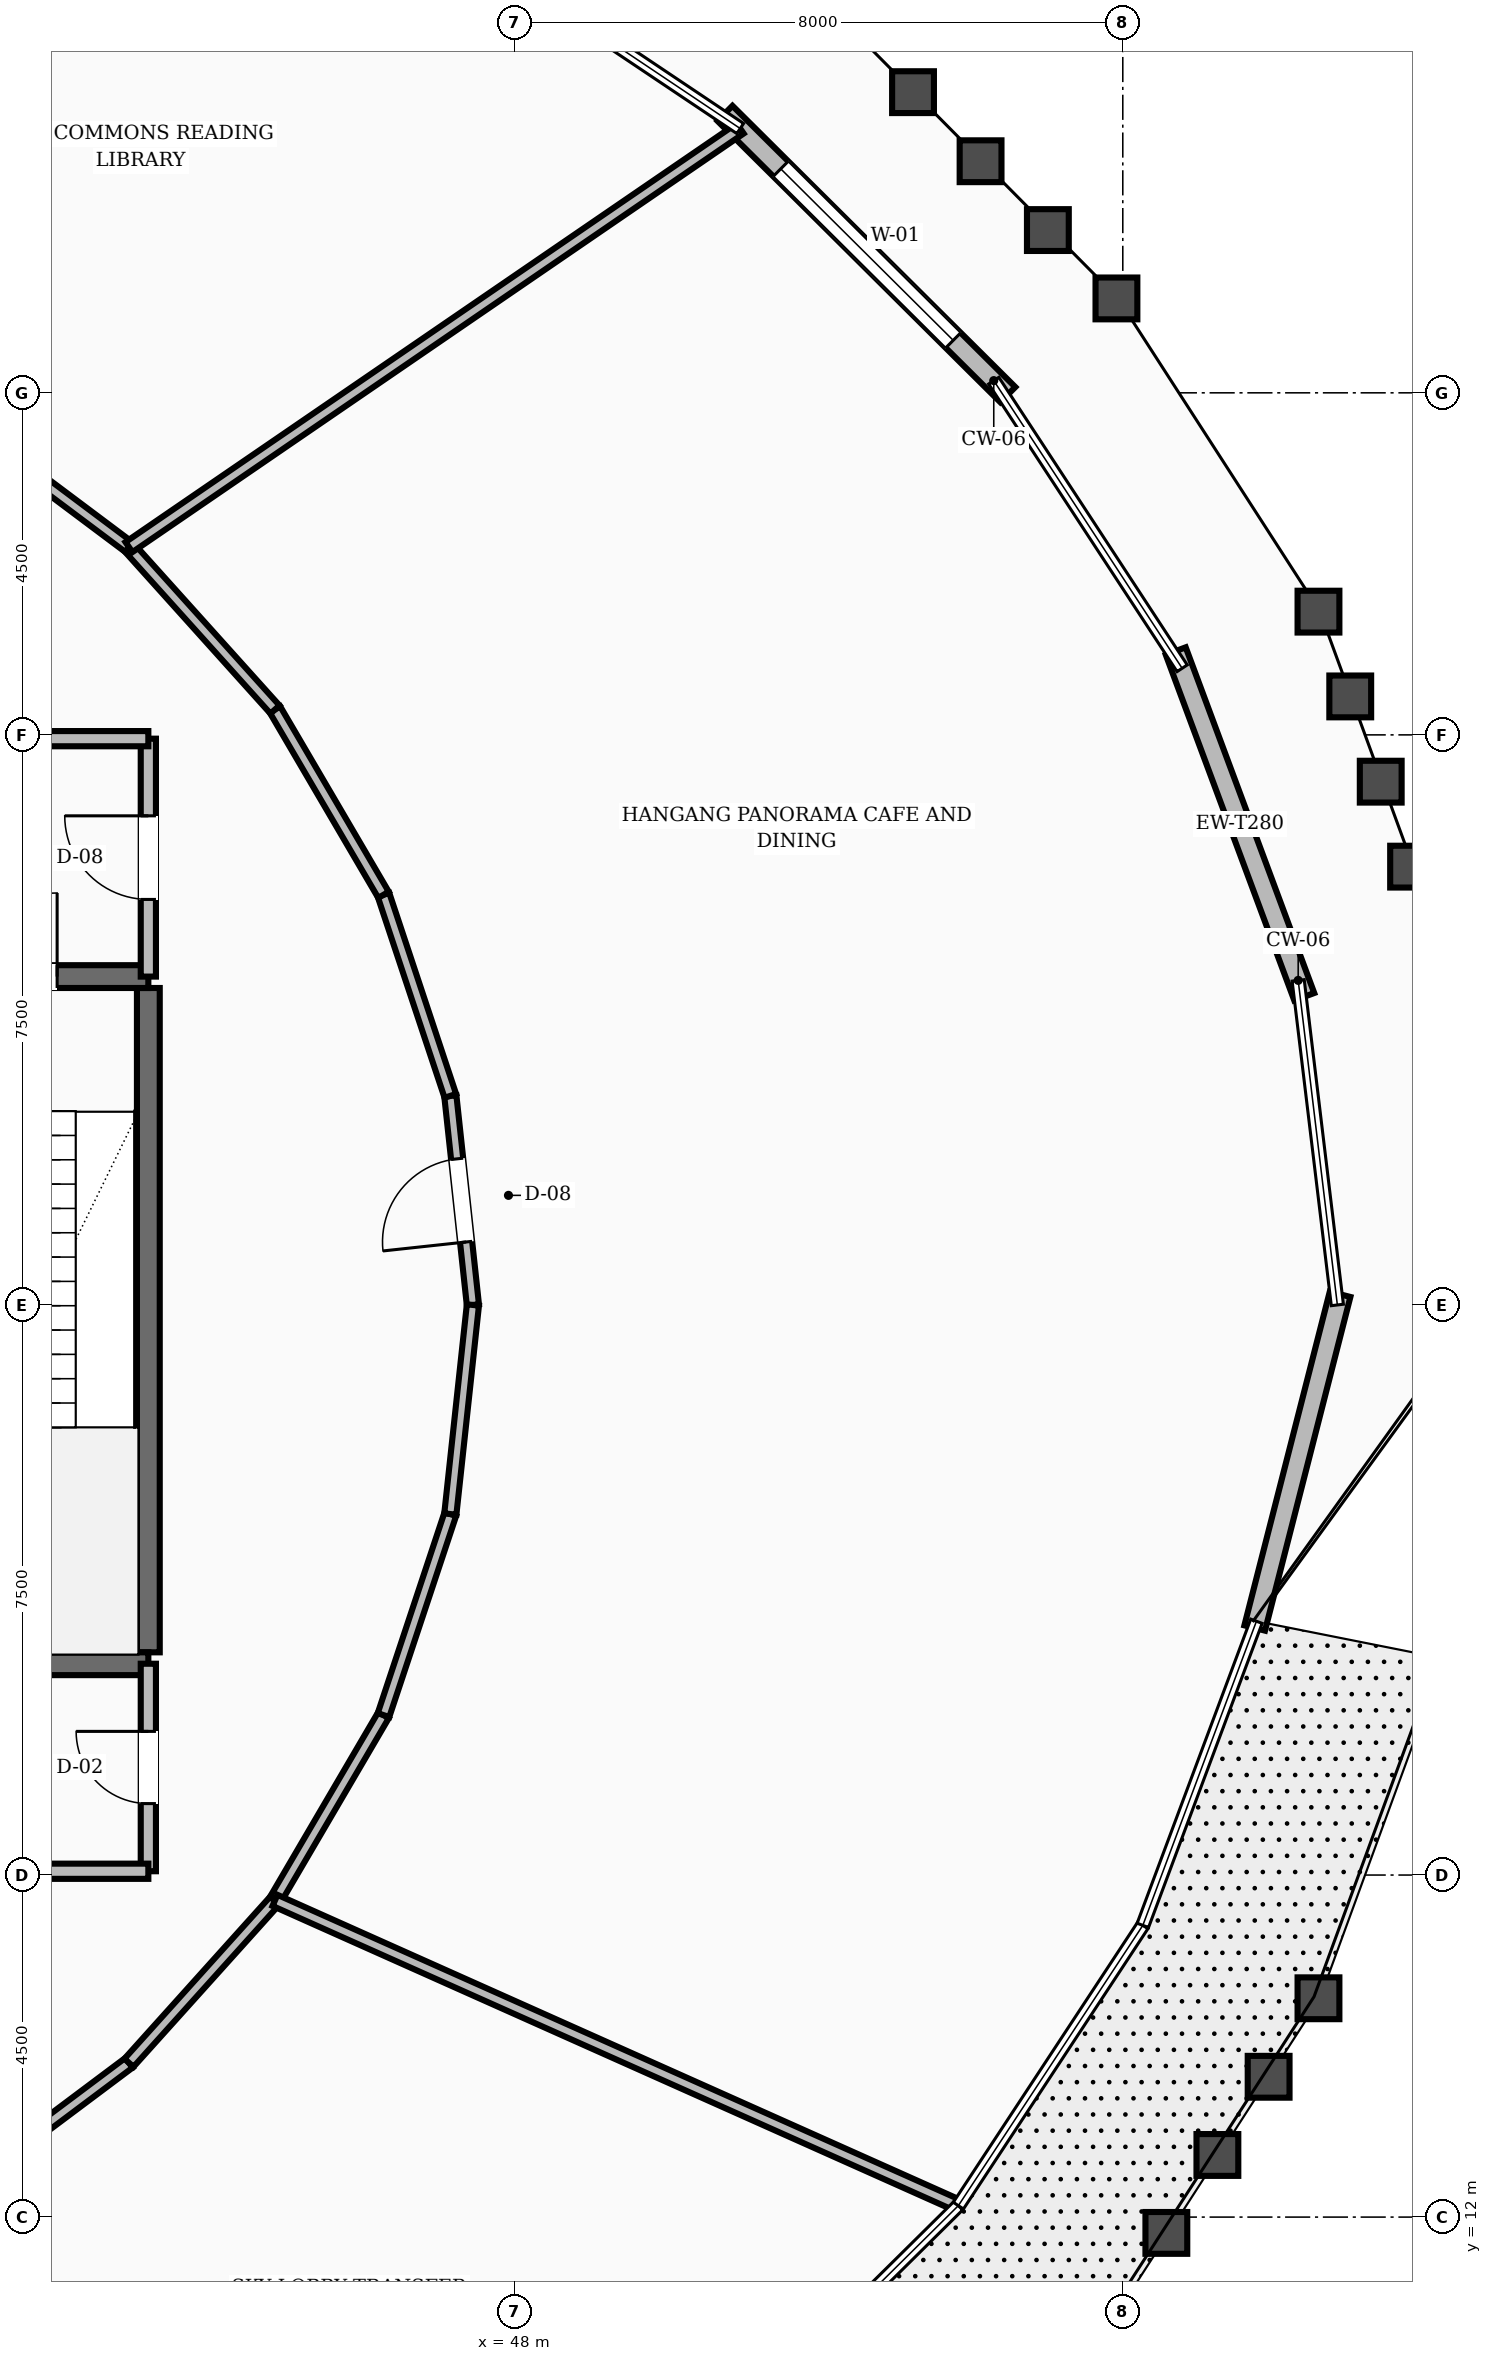
"""IFC4 building model, lengths in metres.
Left out: names, types, materials, properties, quantities, classifications, styles, units other than length and angle.
Written with IfcOpenShell. Run it as: python <this file> out.ifc"""

import sys

from ifc_helpers import new_model, si_unit, direction, frame, frame_2d, origin, place, context, subcontext, project, spatial, rectangle, extrude, element, fill, save


model = new_model("IFC4")
c1 = context("Model", 3, precision=1e-05, world=origin(), true_north=direction((0.0, 1.0)))
c2 = subcontext(c1, "Body", "Model", "MODEL_VIEW")
j1 = project(units=[si_unit("LENGTHUNIT", "METRE"), si_unit("PLANEANGLEUNIT", "RADIAN")], contexts=[c1])
p1 = place(None, origin())
s1 = spatial("IfcSite", under=j1, at=p1, CompositionType="ELEMENT")
p2 = place(p1, origin())
s2 = spatial("IfcBuilding", under=s1, at=p2, CompositionType="ELEMENT")
p3 = place(p2, frame((0.0, 0.0, 106.0)))
s3 = spatial("IfcBuildingStorey", under=s2, at=p3, CompositionType="ELEMENT", Elevation=106.0)
p4 = place(p3, frame((43.18, 19.43, 0.0), z_axis=(0.0, 0.0, 1.0), x_axis=(0.0, 1.0, 0.0)))
e1 = element("IfcWall", 1, at=p4, inside=s3, PredefinedType="SHEAR", context=c2, shape_type="SweptSolid", body=[
    extrude(rectangle(XDim=8.74, YDim=0.3, at=frame_2d((4.37, 0.0))), origin(), (0.0, 0.0, 1.0), 4.8),
])
p5 = place(p3, frame((39.58, 19.28, 0.0), z_axis=(0.0, 0.0, 1.0), x_axis=(1.0, 0.0, 0.0)))
e2 = element("IfcWall", 2, at=p5, inside=s3, PredefinedType="SHEAR", context=c2, shape_type="SweptSolid", body=[
    extrude(rectangle(XDim=3.6, YDim=0.3, at=frame_2d((1.8, 0.0))), origin(), (0.0, 0.0, 1.0), 4.8),
])
p6 = place(p3, frame((39.58, 28.32, 0.0), z_axis=(0.0, 0.0, 1.0), x_axis=(1.0, 0.0, 0.0)))
e3 = element("IfcWall", 3, at=p6, inside=s3, PredefinedType="SHEAR", context=c2, shape_type="SweptSolid", body=[
    extrude(rectangle(XDim=3.6, YDim=0.3, at=frame_2d((1.8, 0.0))), origin(), (0.0, 0.0, 1.0), 4.8),
])
p7 = place(p6, frame((1.3, 0.0, 0.0)))
e4 = element("IfcOpeningElement", 4, at=p7, cuts=e3, PredefinedType="OPENING", context=c2, shape_type="SweptSolid", body=[
    extrude(rectangle(XDim=1.1, YDim=2.1, at=frame_2d((0.55, 1.05))), frame((0.0, 0.16, 0.0), z_axis=(0.0, -1.0, 0.0), x_axis=(1.0, 0.0, 0.0)), (0.0, 0.0, 1.0), 0.32),
])
p8 = place(p3, frame((58.387, 28.055, 0.0), z_axis=(0.0, 0.0, 1.0), x_axis=(-0.348436652238, 0.937332331341, 0.0)))
e5 = element("IfcWall", 5, at=p8, inside=s3, PredefinedType="STANDARD", context=c2, shape_type="SweptSolid", body=[
    extrude(rectangle(XDim=4.852, YDim=0.28, at=frame_2d((2.426, 0.0))), origin(), (0.0, 0.0, 1.0), 3.71),
])
p9 = place(p3, frame((54.487, 35.977, 0.0), z_axis=(0.0, 0.0, 1.0), x_axis=(-0.709127704371, 0.705080065591, 0.0)))
e6 = element("IfcWall", 6, at=p9, inside=s3, PredefinedType="STANDARD", context=c2, shape_type="SweptSolid", body=[
    extrude(rectangle(XDim=5.248, YDim=0.28, at=frame_2d((2.624, 0.0))), origin(), (0.0, 0.0, 1.0), 3.71),
])
p10 = place(p9, frame((1.013, 0.0, 0.8)))
e7 = element("IfcOpeningElement", 7, at=p10, cuts=e6, PredefinedType="OPENING", context=c2, shape_type="SweptSolid", body=[
    extrude(rectangle(XDim=3.2, YDim=1.65, at=frame_2d((1.6, 0.825))), frame((0.0, 0.15, 0.0), z_axis=(0.0, -1.0, 0.0), x_axis=(1.0, 0.0, 0.0)), (0.0, 0.0, 1.0), 0.3),
])
p11 = place(p3, frame((57.736, 19.75, 0.0), z_axis=(0.0, 0.0, 1.0), x_axis=(0.247830898022, 0.968803306139, 0.0)))
e8 = element("IfcWall", 8, at=p11, inside=s3, PredefinedType="STANDARD", context=c2, shape_type="SweptSolid", body=[
    extrude(rectangle(XDim=4.531, YDim=0.28, at=frame_2d((2.266, 0.0))), origin(), (0.0, 0.0, 1.0), 3.71),
])
p12 = place(p3, frame((43.18, 28.32, 0.0), z_axis=(0.0, 0.0, 1.0), x_axis=(0.0, 1.0, 0.0)))
e9 = element("IfcWall", 9, at=p12, inside=s3, PredefinedType="SOLIDWALL", context=c2, shape_type="SweptSolid", body=[
    extrude(rectangle(XDim=3.13, YDim=0.2, at=frame_2d((1.565, 0.0))), origin(), (0.0, 0.0, 1.0), 3.71),
])
p13 = place(p12, frame((1.015, 0.0, 0.0)))
e10 = element("IfcOpeningElement", 10, at=p13, cuts=e9, PredefinedType="OPENING", context=c2, shape_type="SweptSolid", body=[
    extrude(rectangle(XDim=1.1, YDim=2.1, at=frame_2d((0.55, 1.05))), frame((0.0, 0.11, 0.0), z_axis=(0.0, -1.0, 0.0), x_axis=(1.0, 0.0, 0.0)), (0.0, 0.0, 1.0), 0.22),
])
p14 = place(p3, frame((39.2, 31.45, 0.0), z_axis=(0.0, 0.0, 1.0), x_axis=(1.0, 0.0, 0.0)))
e11 = element("IfcWall", 11, at=p14, inside=s3, PredefinedType="SOLIDWALL", context=c2, shape_type="SweptSolid", body=[
    extrude(rectangle(XDim=3.98, YDim=0.2, at=frame_2d((1.99, 0.0))), origin(), (0.0, 0.0, 1.0), 3.71),
])
p15 = place(p3, frame((43.18, 16.55, 0.0), z_axis=(0.0, 0.0, 1.0), x_axis=(0.0, 1.0, 0.0)))
e12 = element("IfcWall", 12, at=p15, inside=s3, PredefinedType="SOLIDWALL", context=c2, shape_type="SweptSolid", body=[
    extrude(rectangle(XDim=2.73, YDim=0.2, at=frame_2d((1.365, 0.0))), origin(), (0.0, 0.0, 1.0), 3.71),
])
p16 = place(p15, frame((0.89, 0.0, 0.0)))
e13 = element("IfcOpeningElement", 13, at=p16, cuts=e12, PredefinedType="OPENING", context=c2, shape_type="SweptSolid", body=[
    extrude(rectangle(XDim=0.95, YDim=2.1, at=frame_2d((0.475, 1.05))), frame((0.0, 0.11, 0.0), z_axis=(0.0, -1.0, 0.0), x_axis=(1.0, 0.0, 0.0)), (0.0, 0.0, 1.0), 0.22),
])
p17 = place(p3, frame((39.2, 16.55, 0.0), z_axis=(0.0, 0.0, 1.0), x_axis=(1.0, 0.0, 0.0)))
e14 = element("IfcWall", 14, at=p17, inside=s3, PredefinedType="SOLIDWALL", context=c2, shape_type="SweptSolid", body=[
    extrude(rectangle(XDim=3.98, YDim=0.2, at=frame_2d((1.99, 0.0))), origin(), (0.0, 0.0, 1.0), 3.71),
])
p18 = place(p3, frame((47.45, 24.0, 0.0), z_axis=(0.0, 0.0, 1.0), x_axis=(-0.107302680622, 0.994226400138, 0.0)))
e15 = element("IfcWall", 15, at=p18, inside=s3, PredefinedType="SOLIDWALL", context=c2, shape_type="SweptSolid", body=[
    extrude(rectangle(XDim=2.767, YDim=0.16, at=frame_2d((1.383, 0.0))), origin(), (0.0, 0.0, 1.0), 3.71),
])
p19 = place(p18, frame((0.833, 0.0, 0.0)))
e16 = element("IfcOpeningElement", 16, at=p19, cuts=e15, PredefinedType="OPENING", context=c2, shape_type="SweptSolid", body=[
    extrude(rectangle(XDim=1.1, YDim=2.1, at=frame_2d((0.55, 1.05))), frame((0.0, 0.09, 0.0), z_axis=(0.0, -1.0, 0.0), x_axis=(1.0, 0.0, 0.0)), (0.0, 0.0, 1.0), 0.18),
])
p20 = place(p3, frame((47.153, 26.751, 0.0), z_axis=(0.0, 0.0, 1.0), x_axis=(-0.315413058649, 0.948954478589, 0.0)))
e17 = element("IfcWall", 17, at=p20, inside=s3, PredefinedType="SOLIDWALL", context=c2, shape_type="SweptSolid", body=[
    extrude(rectangle(XDim=2.787, YDim=0.16, at=frame_2d((1.394, 0.0))), origin(), (0.0, 0.0, 1.0), 3.71),
])
p21 = place(p3, frame((46.274, 29.396, 0.0), z_axis=(0.0, 0.0, 1.0), x_axis=(-0.505380130961, 0.862896820732, 0.0)))
e18 = element("IfcWall", 18, at=p21, inside=s3, PredefinedType="SOLIDWALL", context=c2, shape_type="SweptSolid", body=[
    extrude(rectangle(XDim=2.825, YDim=0.16, at=frame_2d((1.413, 0.0))), origin(), (0.0, 0.0, 1.0), 3.71),
])
p22 = place(p3, frame((44.846, 31.833, 0.0), z_axis=(0.0, 0.0, 1.0), x_axis=(-0.668645478294, 0.743581350194, 0.0)))
e19 = element("IfcWall", 19, at=p22, inside=s3, PredefinedType="SOLIDWALL", context=c2, shape_type="SweptSolid", body=[
    extrude(rectangle(XDim=2.874, YDim=0.16, at=frame_2d((1.437, 0.0))), origin(), (0.0, 0.0, 1.0), 3.71),
])
for number, where, z_axis, x_axis in (
    (20, (42.925, 33.97, 0.0), (0.0, 0.0, 1.0), (-0.8, 0.599, 0.0)),
    (21, (40.583, 12.276, 0.0), (0.0, 0.0, 1.0), (0.8, 0.599, 0.0)),
):
    element("IfcWall", number, at=place(p3, frame(where, z_axis=z_axis, x_axis=x_axis)), inside=s3, PredefinedType="SOLIDWALL", context=c2, shape_type="SweptSolid", body=[
        extrude(rectangle(XDim=2.925, YDim=0.16, at=frame_2d((1.462, 0.0))), origin(), (0.0, 0.0, 1.0), 3.71),
    ])
p23 = place(p3, frame((42.925, 14.03, 0.0), z_axis=(0.0, 0.0, 1.0), x_axis=(0.668645478294, 0.743581350194, 0.0)))
e22 = element("IfcWall", 22, at=p23, inside=s3, PredefinedType="SOLIDWALL", context=c2, shape_type="SweptSolid", body=[
    extrude(rectangle(XDim=2.874, YDim=0.16, at=frame_2d((1.437, 0.0))), origin(), (0.0, 0.0, 1.0), 3.71),
])
p24 = place(p3, frame((44.846, 16.167, 0.0), z_axis=(0.0, 0.0, 1.0), x_axis=(0.505380130961, 0.862896820732, 0.0)))
e23 = element("IfcWall", 23, at=p24, inside=s3, PredefinedType="SOLIDWALL", context=c2, shape_type="SweptSolid", body=[
    extrude(rectangle(XDim=2.825, YDim=0.16, at=frame_2d((1.413, 0.0))), origin(), (0.0, 0.0, 1.0), 3.71),
])
p25 = place(p3, frame((46.274, 18.604, 0.0), z_axis=(0.0, 0.0, 1.0), x_axis=(0.315413058649, 0.948954478589, 0.0)))
e24 = element("IfcWall", 24, at=p25, inside=s3, PredefinedType="SOLIDWALL", context=c2, shape_type="SweptSolid", body=[
    extrude(rectangle(XDim=2.787, YDim=0.16, at=frame_2d((1.394, 0.0))), origin(), (0.0, 0.0, 1.0), 3.71),
])
p26 = place(p3, frame((47.153, 21.249, 0.0), z_axis=(0.0, 0.0, 1.0), x_axis=(0.107302680622, 0.994226400138, 0.0)))
e25 = element("IfcWall", 25, at=p26, inside=s3, PredefinedType="SOLIDWALL", context=c2, shape_type="SweptSolid", body=[
    extrude(rectangle(XDim=2.767, YDim=0.16, at=frame_2d((1.383, 0.0))), origin(), (0.0, 0.0, 1.0), 3.71),
])
p27 = place(p3, frame((44.846, 16.167, 0.0), z_axis=(0.0, 0.0, 1.0), x_axis=(0.913056448799, -0.4078332028, 0.0)))
e26 = element("IfcWall", 26, at=p27, inside=s3, PredefinedType="SOLIDWALL", context=c2, shape_type="SweptSolid", body=[
    extrude(rectangle(XDim=9.847, YDim=0.16, at=frame_2d((4.923, 0.0))), origin(), (0.0, 0.0, 1.0), 3.71),
])
p28 = place(p3, frame((42.925, 33.97, 0.0), z_axis=(0.0, 0.0, 1.0), x_axis=(0.825084174335, 0.56500982758, 0.0)))
e27 = element("IfcWall", 27, at=p28, inside=s3, PredefinedType="SOLIDWALL", context=c2, shape_type="SweptSolid", body=[
    extrude(rectangle(XDim=9.747, YDim=0.16, at=frame_2d((4.874, 0.0))), origin(), (0.0, 0.0, 1.0), 3.71),
])
p29 = place(p10, origin())
e28 = element("IfcWindow", 28, at=p29, inside=s3, PartitioningType="SINGLE_PANEL", PredefinedType="WINDOW", context=c2, shape_type="SweptSolid", body=[
    extrude(rectangle(XDim=3.2, YDim=1.65, at=frame_2d((1.6, 0.825))), frame((0.0, 0.03, 0.0), z_axis=(0.0, -1.0, 0.0), x_axis=(1.0, 0.0, 0.0)), (0.0, 0.0, 1.0), 0.06),
])
fill(e7, e28)
p30 = place(p7, origin())
e29 = element("IfcDoor", 29, at=p30, inside=s3, OperationType="SINGLE_SWING_RIGHT", PredefinedType="DOOR", context=c2, shape_type="SweptSolid", body=[
    extrude(rectangle(XDim=1.1, YDim=2.1, at=frame_2d((0.55, 1.05))), frame((0.0, 0.025, 0.0), z_axis=(0.0, -1.0, 0.0), x_axis=(1.0, 0.0, 0.0)), (0.0, 0.0, 1.0), 0.05),
])
fill(e4, e29)
p31 = place(p13, origin())
e30 = element("IfcDoor", 30, at=p31, inside=s3, OperationType="SINGLE_SWING_RIGHT", PredefinedType="DOOR", context=c2, shape_type="SweptSolid", body=[
    extrude(rectangle(XDim=1.1, YDim=2.1, at=frame_2d((0.55, 1.05))), frame((0.0, 0.025, 0.0), z_axis=(0.0, -1.0, 0.0), x_axis=(1.0, 0.0, 0.0)), (0.0, 0.0, 1.0), 0.05),
])
fill(e10, e30)
p32 = place(p16, origin())
e31 = element("IfcDoor", 31, at=p32, inside=s3, OperationType="SINGLE_SWING_RIGHT", PredefinedType="DOOR", context=c2, shape_type="SweptSolid", body=[
    extrude(rectangle(XDim=0.95, YDim=2.1, at=frame_2d((0.475, 1.05))), frame((0.0, 0.025, 0.0), z_axis=(0.0, -1.0, 0.0), x_axis=(1.0, 0.0, 0.0)), (0.0, 0.0, 1.0), 0.05),
])
fill(e13, e31)
p33 = place(p19, origin())
e32 = element("IfcDoor", 32, at=p33, inside=s3, OperationType="SINGLE_SWING_LEFT", PredefinedType="DOOR", context=c2, shape_type="SweptSolid", body=[
    extrude(rectangle(XDim=1.1, YDim=2.1, at=frame_2d((0.55, 1.05))), frame((0.0, 0.025, 0.0), z_axis=(0.0, -1.0, 0.0), x_axis=(1.0, 0.0, 0.0)), (0.0, 0.0, 1.0), 0.05),
])
fill(e16, e32)
save(model, sys.argv[1])
